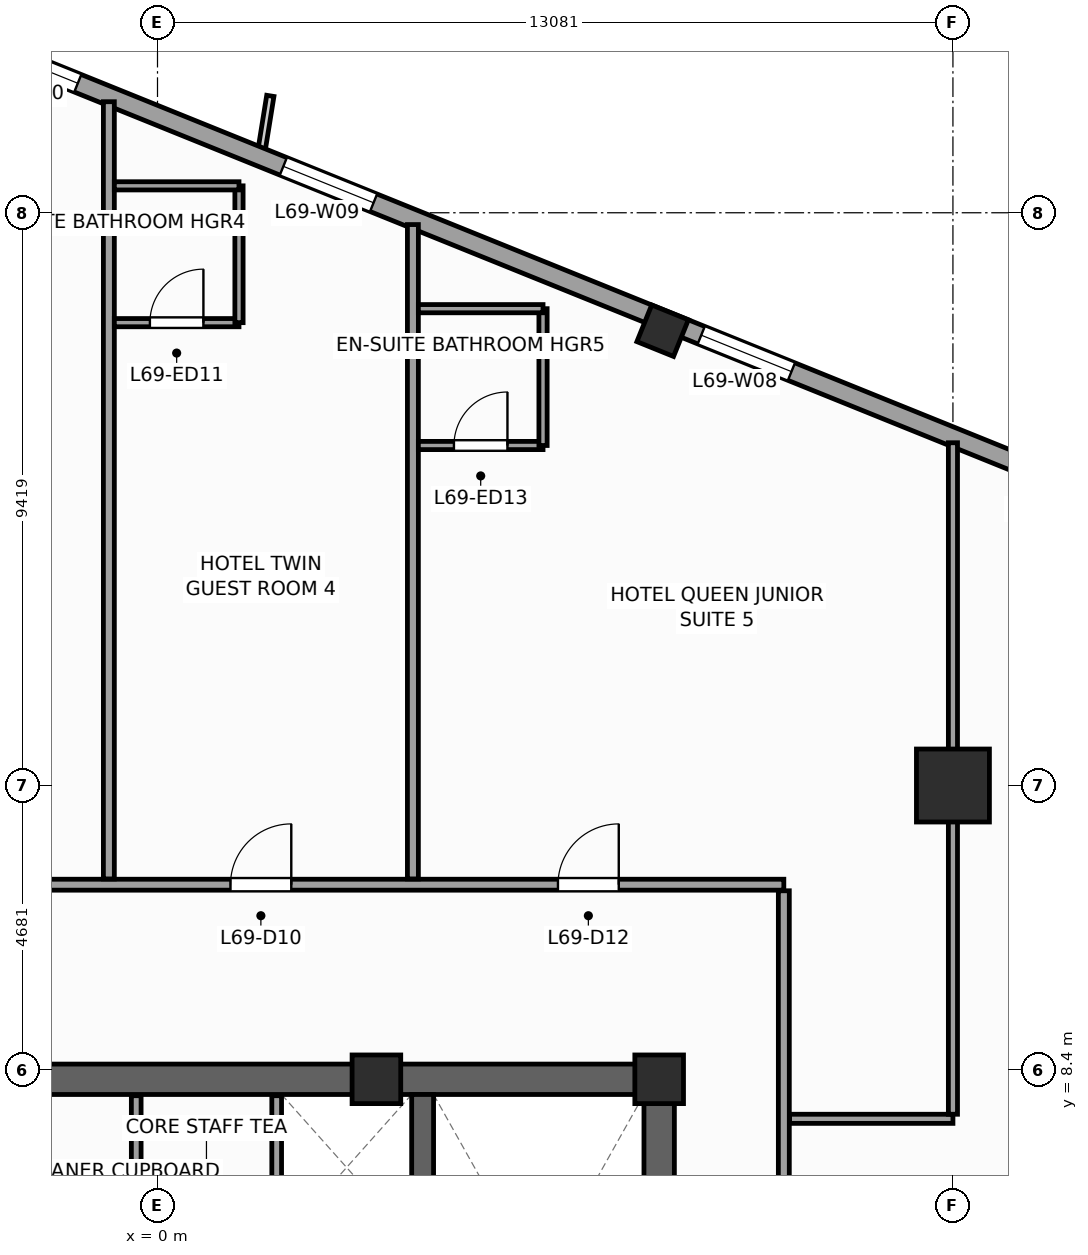
"""IFC4 building model, lengths in metres.
Left out: names, types, materials, properties, quantities, classifications, styles, units other than length and angle.
Written with IfcOpenShell. Run it as: python <this file> out.ifc"""

import sys

from ifc_helpers import new_model, si_unit, direction, frame, frame_2d, origin, origin_2d, place, context, subcontext, project, spatial, rectangle, extrude, source, transform, mapped, element, fill, save


model = new_model("IFC4")
c1 = context("Model", 3, precision=1e-05, world=origin(), true_north=direction((0.0, 1.0)))
c2 = subcontext(c1, "Body", "Model", "MODEL_VIEW")
j1 = project(units=[si_unit("LENGTHUNIT", "METRE"), si_unit("PLANEANGLEUNIT", "RADIAN")], contexts=[c1])
p1 = place(None, origin())
s1 = spatial("IfcSite", under=j1, at=p1, CompositionType="ELEMENT")
p2 = place(p1, origin())
s2 = spatial("IfcBuilding", under=s1, at=p2, CompositionType="ELEMENT")
p3 = place(p2, frame((0.0, 0.0, 283.2)))
s3 = spatial("IfcBuildingStorey", under=s2, at=p3, CompositionType="ELEMENT", Elevation=283.2)
p4 = place(p3, frame((-8.5, 8.25, 0.0), z_axis=(0.0, 0.0, 1.0), x_axis=(1.0, 0.0, 0.0)))
e1 = element("IfcWall", 1, at=p4, inside=s3, PredefinedType="SHEAR", context=c2, shape_type="SweptSolid", body=[
    extrude(rectangle(XDim=17.0, YDim=0.5, at=frame_2d((8.5, 0.0))), origin(), (0.0, 0.0, 1.0), 3.6),
])
p5 = place(p3, frame((8.25, -8.0, 0.0), z_axis=(0.0, 0.0, 1.0), x_axis=(0.0, 1.0, 0.0)))
e2 = element("IfcWall", 2, at=p5, inside=s3, PredefinedType="SHEAR", context=c2, shape_type="SweptSolid", body=[
    extrude(rectangle(XDim=16.0, YDim=0.5, at=frame_2d((8.0, 0.0))), origin(), (0.0, 0.0, 1.0), 3.6),
])
p6 = place(p5, frame((4.69, 0.0, 0.0)))
e3 = element("IfcOpeningElement", 3, at=p6, cuts=e2, PredefinedType="OPENING", context=c2, shape_type="SweptSolid", body=[
    extrude(rectangle(XDim=1.3, YDim=2.2, at=frame_2d((0.65, 1.1))), frame((0.0, 0.26, 0.0), z_axis=(0.0, -1.0, 0.0), x_axis=(1.0, 0.0, 0.0)), (0.0, 0.0, 1.0), 0.52),
])
p7 = place(p3, frame((4.36, -8.0, 0.0), z_axis=(0.0, 0.0, 1.0), x_axis=(0.0, 1.0, 0.0)))
e4 = element("IfcWall", 4, at=p7, inside=s3, PredefinedType="SHEAR", context=c2, shape_type="SweptSolid", body=[
    extrude(rectangle(XDim=16.0, YDim=0.36, at=frame_2d((8.0, 0.0))), origin(), (0.0, 0.0, 1.0), 3.6),
])
m1 = source(origin(), c2, "Body", "SweptSolid", [
    extrude(rectangle(XDim=0.8, YDim=0.8, at=origin_2d()), origin(), (0.0, 0.0, 1.0), 3.6),
])
for number, where, z_axis, x_axis in (
    (5, (8.25, 8.25, 0.0), (0.0, 0.0, 1.0), (1.0, 0.0, 0.0)),
    (6, (3.6, 8.25, 0.0), (0.0, 0.0, 1.0), (1.0, 0.0, 0.0)),
):
    element("IfcColumn", number, at=place(p3, frame(where, z_axis=z_axis, x_axis=x_axis)), inside=s3, PredefinedType="PILASTER", context=c2, shape_type="MappedRepresentation", body=[
        mapped(m1, transform((0.0, 0.0, 0.0), scale=1.0)),
    ])
m2 = source(origin(), c2, "Body", "SweptSolid", [
    extrude(rectangle(XDim=1.2, YDim=1.2, at=origin_2d()), origin(), (0.0, 0.0, 1.0), 3.6),
])
p8 = place(p3, frame((13.081, 13.081, 0.0), z_axis=(0.0, 0.0, 1.0), x_axis=(1.0, 0.0, 0.0)))
e7 = element("IfcColumn", 7, at=p8, inside=s3, PredefinedType="COLUMN", context=c2, shape_type="MappedRepresentation", body=[
    mapped(m2, transform((0.0, 0.0, 0.0), scale=1.0)),
])
m3 = source(origin(), c2, "Body", "SweptSolid", [
    extrude(rectangle(XDim=0.65, YDim=0.65, at=origin_2d()), origin(), (0.0, 0.0, 1.0), 3.6),
])
p9 = place(p3, frame((8.307, 20.56, 0.0), z_axis=(0.0, 0.0, 1.0), x_axis=(0.374606593416, 0.927183854567, 0.0)))
e8 = element("IfcColumn", 8, at=p9, inside=s3, PredefinedType="COLUMN", context=c2, shape_type="MappedRepresentation", body=[
    mapped(m3, transform((0.0, 0.0, 0.0), scale=1.0)),
])
p10 = place(p3, frame((23.813, 14.479, 0.0), z_axis=(0.0, 0.0, 1.0), x_axis=(-0.927182657188, 0.374609557019, 0.0)))
e9 = element("IfcWall", 9, at=p10, inside=s3, PredefinedType="STANDARD", context=c2, shape_type="SweptSolid", body=[
    extrude(rectangle(XDim=33.31, YDim=0.31, at=frame_2d((16.655, 0.0))), origin(), (0.0, 0.0, 1.0), 2.75),
])
p11 = place(p10, frame((3.197, 0.0, 0.47)))
e10 = element("IfcOpeningElement", 10, at=p11, cuts=e9, PredefinedType="OPENING", context=c2, shape_type="SweptSolid", body=[
    extrude(rectangle(XDim=1.6, YDim=2.1, at=frame_2d((0.8, 1.05))), frame((0.0, 0.165, 0.0), z_axis=(0.0, -1.0, 0.0), x_axis=(1.0, 0.0, 0.0)), (0.0, 0.0, 1.0), 0.33),
])
p12 = place(p10, frame((8.86, 0.0, 0.47)))
e11 = element("IfcOpeningElement", 11, at=p12, cuts=e9, PredefinedType="OPENING", context=c2, shape_type="SweptSolid", body=[
    extrude(rectangle(XDim=1.6, YDim=2.1, at=frame_2d((0.8, 1.05))), frame((0.0, 0.165, 0.0), z_axis=(0.0, -1.0, 0.0), x_axis=(1.0, 0.0, 0.0)), (0.0, 0.0, 1.0), 0.33),
])
p13 = place(p10, frame((14.439, 0.0, 0.47)))
e12 = element("IfcOpeningElement", 12, at=p13, cuts=e9, PredefinedType="OPENING", context=c2, shape_type="SweptSolid", body=[
    extrude(rectangle(XDim=1.6, YDim=2.1, at=frame_2d((0.8, 1.05))), frame((0.0, 0.165, 0.0), z_axis=(0.0, -1.0, 0.0), x_axis=(1.0, 0.0, 0.0)), (0.0, 0.0, 1.0), 0.33),
])
p14 = place(p10, frame((21.851, 0.0, 0.47)))
e13 = element("IfcOpeningElement", 13, at=p14, cuts=e9, PredefinedType="OPENING", context=c2, shape_type="SweptSolid", body=[
    extrude(rectangle(XDim=1.6, YDim=2.1, at=frame_2d((0.8, 1.05))), frame((0.0, 0.165, 0.0), z_axis=(0.0, -1.0, 0.0), x_axis=(1.0, 0.0, 0.0)), (0.0, 0.0, 1.0), 0.33),
])
p15 = place(p10, frame((27.097, 0.0, 0.47)))
e14 = element("IfcOpeningElement", 14, at=p15, cuts=e9, PredefinedType="OPENING", context=c2, shape_type="SweptSolid", body=[
    extrude(rectangle(XDim=1.6, YDim=2.1, at=frame_2d((0.8, 1.05))), frame((0.0, 0.165, 0.0), z_axis=(0.0, -1.0, 0.0), x_axis=(1.0, 0.0, 0.0)), (0.0, 0.0, 1.0), 0.33),
])
p16 = place(p3, frame((1.96, 4.58, 0.0), z_axis=(0.0, 0.0, 1.0), x_axis=(0.0, 1.0, 0.0)))
e15 = element("IfcWall", 15, at=p16, inside=s3, PredefinedType="PARTITIONING", context=c2, shape_type="SweptSolid", body=[
    extrude(rectangle(XDim=3.4, YDim=0.16, at=frame_2d((1.7, 0.0))), origin(), (0.0, 0.0, 1.0), 3.35),
])
p17 = place(p3, frame((-0.35, 4.6, 0.0), z_axis=(0.0, 0.0, 1.0), x_axis=(0.0, 1.0, 0.0)))
e16 = element("IfcWall", 16, at=p17, inside=s3, PredefinedType="PARTITIONING", context=c2, shape_type="SweptSolid", body=[
    extrude(rectangle(XDim=3.38, YDim=0.16, at=frame_2d((1.69, 0.0))), origin(), (0.0, 0.0, 1.0), 3.35),
])
p18 = place(p3, frame((-11.45, 11.45, 0.0), z_axis=(0.0, 0.0, 1.0), x_axis=(1.0, 0.0, 0.0)))
e17 = element("IfcWall", 17, at=p18, inside=s3, PredefinedType="PARTITIONING", context=c2, shape_type="SweptSolid", body=[
    extrude(rectangle(XDim=21.75, YDim=0.18, at=frame_2d((10.875, 0.0))), origin(), (0.0, 0.0, 1.0), 3.35),
])
p19 = place(p18, frame((2.639, 0.0, 0.0)))
e18 = element("IfcOpeningElement", 18, at=p19, cuts=e17, PredefinedType="OPENING", context=c2, shape_type="SweptSolid", body=[
    extrude(rectangle(XDim=1.0, YDim=2.15, at=frame_2d((0.5, 1.075))), frame((0.0, 0.1, 0.0), z_axis=(0.0, -1.0, 0.0), x_axis=(1.0, 0.0, 0.0)), (0.0, 0.0, 1.0), 0.2),
])
p20 = place(p18, frame((7.8, 0.0, 0.0)))
e19 = element("IfcOpeningElement", 19, at=p20, cuts=e17, PredefinedType="OPENING", context=c2, shape_type="SweptSolid", body=[
    extrude(rectangle(XDim=1.0, YDim=2.15, at=frame_2d((0.5, 1.075))), frame((0.0, 0.1, 0.0), z_axis=(0.0, -1.0, 0.0), x_axis=(1.0, 0.0, 0.0)), (0.0, 0.0, 1.0), 0.2),
])
p21 = place(p18, frame((12.65, 0.0, 0.0)))
e20 = element("IfcOpeningElement", 20, at=p21, cuts=e17, PredefinedType="OPENING", context=c2, shape_type="SweptSolid", body=[
    extrude(rectangle(XDim=1.0, YDim=2.15, at=frame_2d((0.5, 1.075))), frame((0.0, 0.1, 0.0), z_axis=(0.0, -1.0, 0.0), x_axis=(1.0, 0.0, 0.0)), (0.0, 0.0, 1.0), 0.2),
])
p22 = place(p18, frame((18.036, 0.0, 0.0)))
e21 = element("IfcOpeningElement", 21, at=p22, cuts=e17, PredefinedType="OPENING", context=c2, shape_type="SweptSolid", body=[
    extrude(rectangle(XDim=1.0, YDim=2.15, at=frame_2d((0.5, 1.075))), frame((0.0, 0.1, 0.0), z_axis=(0.0, -1.0, 0.0), x_axis=(1.0, 0.0, 0.0)), (0.0, 0.0, 1.0), 0.2),
])
p23 = place(p3, frame((10.3, -12.35, 0.0), z_axis=(0.0, 0.0, 1.0), x_axis=(0.0, 1.0, 0.0)))
e22 = element("IfcWall", 22, at=p23, inside=s3, PredefinedType="PARTITIONING", context=c2, shape_type="SweptSolid", body=[
    extrude(rectangle(XDim=23.7, YDim=0.18, at=frame_2d((11.85, 0.0))), origin(), (0.0, 0.0, 1.0), 3.35),
])
p24 = place(p23, frame((17.65, 0.0, 0.0)))
e23 = element("IfcOpeningElement", 23, at=p24, cuts=e22, PredefinedType="OPENING", context=c2, shape_type="SweptSolid", body=[
    extrude(rectangle(XDim=1.0, YDim=2.15, at=frame_2d((0.5, 1.075))), frame((0.0, 0.1, 0.0), z_axis=(0.0, -1.0, 0.0), x_axis=(1.0, 0.0, 0.0)), (0.0, 0.0, 1.0), 0.2),
])
p25 = place(p23, frame((13.85, 0.0, 0.0)))
e24 = element("IfcOpeningElement", 24, at=p25, cuts=e22, PredefinedType="OPENING", context=c2, shape_type="SweptSolid", body=[
    extrude(rectangle(XDim=1.0, YDim=2.15, at=frame_2d((0.5, 1.075))), frame((0.0, 0.1, 0.0), z_axis=(0.0, -1.0, 0.0), x_axis=(1.0, 0.0, 0.0)), (0.0, 0.0, 1.0), 0.2),
])
p26 = place(p23, frame((9.85, 0.0, 0.0)))
e25 = element("IfcOpeningElement", 25, at=p26, cuts=e22, PredefinedType="OPENING", context=c2, shape_type="SweptSolid", body=[
    extrude(rectangle(XDim=1.0, YDim=2.15, at=frame_2d((0.5, 1.075))), frame((0.0, 0.1, 0.0), z_axis=(0.0, -1.0, 0.0), x_axis=(1.0, 0.0, 0.0)), (0.0, 0.0, 1.0), 0.2),
])
p27 = place(p23, frame((6.05, 0.0, 0.0)))
e26 = element("IfcOpeningElement", 26, at=p27, cuts=e22, PredefinedType="OPENING", context=c2, shape_type="SweptSolid", body=[
    extrude(rectangle(XDim=1.0, YDim=2.15, at=frame_2d((0.5, 1.075))), frame((0.0, 0.1, 0.0), z_axis=(0.0, -1.0, 0.0), x_axis=(1.0, 0.0, 0.0)), (0.0, 0.0, 1.0), 0.2),
])
p28 = place(p3, frame((-0.8, 11.545, 0.0), z_axis=(0.0, 0.0, 1.0), x_axis=(0.0, 1.0, 0.0)))
e27 = element("IfcWall", 27, at=p28, inside=s3, PredefinedType="PARTITIONING", context=c2, shape_type="SweptSolid", body=[
    extrude(rectangle(XDim=12.781, YDim=0.18, at=frame_2d((6.391, 0.0))), origin(), (0.0, 0.0, 1.0), 3.02),
])
p29 = place(p3, frame((4.2, 11.545, 0.0), z_axis=(0.0, 0.0, 1.0), x_axis=(0.0, 1.0, 0.0)))
e28 = element("IfcWall", 28, at=p29, inside=s3, PredefinedType="PARTITIONING", context=c2, shape_type="SweptSolid", body=[
    extrude(rectangle(XDim=10.761, YDim=0.18, at=frame_2d((5.38, 0.0))), origin(), (0.0, 0.0, 1.0), 3.02),
])
p30 = place(p3, frame((10.395, 7.6, 0.0), z_axis=(0.0, 0.0, 1.0), x_axis=(1.0, 0.0, 0.0)))
e29 = element("IfcWall", 29, at=p30, inside=s3, PredefinedType="PARTITIONING", context=c2, shape_type="SweptSolid", body=[
    extrude(rectangle(XDim=2.686, YDim=0.15, at=frame_2d((1.343, 0.0))), origin(), (0.0, 0.0, 1.0), 3.35),
])
p31 = place(p3, frame((13.081, 7.675, 0.0), z_axis=(0.0, 0.0, 1.0), x_axis=(0.0, 1.0, 0.0)))
e30 = element("IfcWall", 30, at=p31, inside=s3, PredefinedType="PARTITIONING", context=c2, shape_type="SweptSolid", body=[
    extrude(rectangle(XDim=11.043, YDim=0.15, at=frame_2d((5.521, 0.0))), origin(), (0.0, 0.0, 1.0), 2.45),
])
p32 = place(p3, frame((-0.71, 20.693, 0.0), z_axis=(0.0, 0.0, 1.0), x_axis=(1.0, 0.0, 0.0)))
e31 = element("IfcWall", 31, at=p32, inside=s3, PredefinedType="PARTITIONING", context=c2, shape_type="SweptSolid", body=[
    extrude(rectangle(XDim=2.05, YDim=0.135, at=frame_2d((1.025, 0.0))), origin(), (0.0, 0.0, 1.0), 3.35),
])
p33 = place(p32, frame((0.585, 0.0, 0.0)))
e32 = element("IfcOpeningElement", 32, at=p33, cuts=e31, PredefinedType="OPENING", context=c2, shape_type="SweptSolid", body=[
    extrude(rectangle(XDim=0.88, YDim=2.1, at=frame_2d((0.44, 1.05))), frame((0.0, 0.078, 0.0), z_axis=(0.0, -1.0, 0.0), x_axis=(1.0, 0.0, 0.0)), (0.0, 0.0, 1.0), 0.155),
])
p34 = place(p3, frame((1.34, 20.693, 0.0), z_axis=(0.0, 0.0, 1.0), x_axis=(0.0, 1.0, 0.0)))
e33 = element("IfcWall", 33, at=p34, inside=s3, PredefinedType="PARTITIONING", context=c2, shape_type="SweptSolid", body=[
    extrude(rectangle(XDim=2.25, YDim=0.135, at=frame_2d((1.125, 0.0))), origin(), (0.0, 0.0, 1.0), 3.35),
])
p35 = place(p3, frame((-0.71, 22.943, 0.0), z_axis=(0.0, 0.0, 1.0), x_axis=(1.0, 0.0, 0.0)))
e34 = element("IfcWall", 34, at=p35, inside=s3, PredefinedType="PARTITIONING", context=c2, shape_type="SweptSolid", body=[
    extrude(rectangle(XDim=2.05, YDim=0.135, at=frame_2d((1.025, 0.0))), origin(), (0.0, 0.0, 1.0), 3.35),
])
p36 = place(p3, frame((4.29, 18.673, 0.0), z_axis=(0.0, 0.0, 1.0), x_axis=(1.0, 0.0, 0.0)))
e35 = element("IfcWall", 35, at=p36, inside=s3, PredefinedType="PARTITIONING", context=c2, shape_type="SweptSolid", body=[
    extrude(rectangle(XDim=2.05, YDim=0.135, at=frame_2d((1.025, 0.0))), origin(), (0.0, 0.0, 1.0), 2.95),
])
p37 = place(p36, frame((0.585, 0.0, 0.0)))
e36 = element("IfcOpeningElement", 36, at=p37, cuts=e35, PredefinedType="OPENING", context=c2, shape_type="SweptSolid", body=[
    extrude(rectangle(XDim=0.88, YDim=2.1, at=frame_2d((0.44, 1.05))), frame((0.0, 0.078, 0.0), z_axis=(0.0, -1.0, 0.0), x_axis=(1.0, 0.0, 0.0)), (0.0, 0.0, 1.0), 0.155),
])
p38 = place(p3, frame((6.34, 18.673, 0.0), z_axis=(0.0, 0.0, 1.0), x_axis=(0.0, 1.0, 0.0)))
e37 = element("IfcWall", 37, at=p38, inside=s3, PredefinedType="PARTITIONING", context=c2, shape_type="SweptSolid", body=[
    extrude(rectangle(XDim=2.25, YDim=0.135, at=frame_2d((1.125, 0.0))), origin(), (0.0, 0.0, 1.0), 3.35),
])
p39 = place(p3, frame((4.29, 20.923, 0.0), z_axis=(0.0, 0.0, 1.0), x_axis=(1.0, 0.0, 0.0)))
e38 = element("IfcWall", 38, at=p39, inside=s3, PredefinedType="PARTITIONING", context=c2, shape_type="SweptSolid", body=[
    extrude(rectangle(XDim=2.05, YDim=0.135, at=frame_2d((1.025, 0.0))), origin(), (0.0, 0.0, 1.0), 3.35),
])
m4 = source(origin(), c2, "Body", "SweptSolid", [
    extrude(rectangle(XDim=1.6, YDim=2.1, at=frame_2d((0.8, 1.05))), frame((0.0, 0.03, 0.0), z_axis=(0.0, -1.0, 0.0), x_axis=(1.0, 0.0, 0.0)), (0.0, 0.0, 1.0), 0.06),
])
p40 = place(p13, origin())
e39 = element("IfcWindow", 39, at=p40, inside=s3, PartitioningType="SINGLE_PANEL", PredefinedType="WINDOW", context=c2, shape_type="MappedRepresentation", body=[
    mapped(m4, transform((0.0, 0.0, 0.0), scale=1.0)),
])
fill(e12, e39)
p41 = place(p14, origin())
e40 = element("IfcWindow", 40, at=p41, inside=s3, PartitioningType="SINGLE_PANEL", PredefinedType="WINDOW", context=c2, shape_type="MappedRepresentation", body=[
    mapped(m4, transform((0.0, 0.0, 0.0), scale=1.0)),
])
fill(e13, e40)
p42 = place(p15, origin())
e41 = element("IfcWindow", 41, at=p42, inside=s3, PartitioningType="SINGLE_PANEL", PredefinedType="WINDOW", context=c2, shape_type="MappedRepresentation", body=[
    mapped(m4, transform((0.0, 0.0, 0.0), scale=1.0)),
])
fill(e14, e41)
m5 = source(origin(), c2, "Body", "SweptSolid", [
    extrude(rectangle(XDim=1.0, YDim=2.15, at=frame_2d((0.5, 1.075))), frame((0.0, 0.025, 0.0), z_axis=(0.0, -1.0, 0.0), x_axis=(1.0, 0.0, 0.0)), (0.0, 0.0, 1.0), 0.05),
])
p43 = place(p21, origin())
e42 = element("IfcDoor", 42, at=p43, inside=s3, OperationType="SINGLE_SWING_RIGHT", PredefinedType="DOOR", context=c2, shape_type="MappedRepresentation", body=[
    mapped(m5, transform((0.0, 0.0, 0.0), scale=1.0)),
])
fill(e20, e42)
m6 = source(origin(), c2, "Body", "SweptSolid", [
    extrude(rectangle(XDim=0.88, YDim=2.1, at=frame_2d((0.44, 1.05))), frame((0.0, 0.025, 0.0), z_axis=(0.0, -1.0, 0.0), x_axis=(1.0, 0.0, 0.0)), (0.0, 0.0, 1.0), 0.05),
])
p44 = place(p33, origin())
e43 = element("IfcDoor", 43, at=p44, inside=s3, OperationType="SINGLE_SWING_RIGHT", PredefinedType="DOOR", context=c2, shape_type="MappedRepresentation", body=[
    mapped(m6, transform((0.0, 0.0, 0.0), scale=1.0)),
])
fill(e32, e43)
p45 = place(p22, origin())
e44 = element("IfcDoor", 44, at=p45, inside=s3, OperationType="SINGLE_SWING_RIGHT", PredefinedType="DOOR", context=c2, shape_type="MappedRepresentation", body=[
    mapped(m5, transform((0.0, 0.0, 0.0), scale=1.0)),
])
fill(e21, e44)
p46 = place(p37, origin())
e45 = element("IfcDoor", 45, at=p46, inside=s3, OperationType="SINGLE_SWING_RIGHT", PredefinedType="DOOR", context=c2, shape_type="MappedRepresentation", body=[
    mapped(m6, transform((0.0, 0.0, 0.0), scale=1.0)),
])
fill(e36, e45)
save(model, sys.argv[1])
